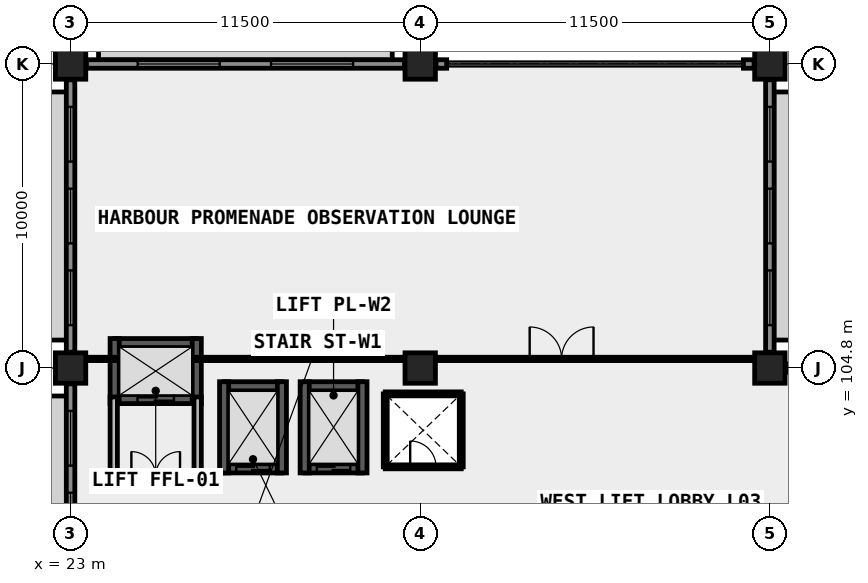
"""IFC4 building model, lengths in metres.
Left out: names, types, materials, properties, quantities, classifications, styles, units other than length and angle.
Written with IfcOpenShell. Run it as: python <this file> out.ifc"""

import sys

from ifc_helpers import new_model, si_unit, direction, frame, frame_2d, origin, origin_2d, place, context, subcontext, project, spatial, rectangle, extrude, element, fill, save


model = new_model("IFC4")
c1 = context("Model", 3, precision=1e-05, world=origin(), true_north=direction((0.0, 1.0)))
c2 = subcontext(c1, "Body", "Model", "MODEL_VIEW")
j1 = project(units=[si_unit("LENGTHUNIT", "METRE"), si_unit("PLANEANGLEUNIT", "RADIAN")], contexts=[c1])
p1 = place(None, origin())
s1 = spatial("IfcSite", under=j1, at=p1, CompositionType="ELEMENT")
p2 = place(p1, origin())
s2 = spatial("IfcBuilding", under=s1, at=p2, CompositionType="ELEMENT")
p3 = place(p2, frame((0.0, 0.0, 13.8)))
s3 = spatial("IfcBuildingStorey", under=s2, at=p3, CompositionType="ELEMENT", Elevation=13.8)
for number, where, z_axis, x_axis in (
    (1, (23.0, 104.8, 0.0), (0.0, 0.0, 1.0), (1.0, 0.0, 0.0)),
    (2, (23.0, 114.8, 0.0), (0.0, 0.0, 1.0), (1.0, 0.0, 0.0)),
    (3, (34.5, 104.8, 0.0), (0.0, 0.0, 1.0), (1.0, 0.0, 0.0)),
    (4, (34.5, 114.8, 0.0), (0.0, 0.0, 1.0), (1.0, 0.0, 0.0)),
    (5, (46.0, 104.8, 0.0), (0.0, 0.0, 1.0), (1.0, 0.0, 0.0)),
    (6, (46.0, 114.8, 0.0), (0.0, 0.0, 1.0), (1.0, 0.0, 0.0)),
):
    element("IfcColumn", number, at=place(p3, frame(where, z_axis=z_axis, x_axis=x_axis)), inside=s3, PredefinedType="COLUMN", context=c2, shape_type="SweptSolid", body=[
        extrude(rectangle(XDim=1.0, YDim=1.0, at=origin_2d()), origin(), (0.0, 0.0, 1.0), 4.5),
    ])
p4 = place(p3, frame((24.45, 103.78, 0.0), z_axis=(0.0, 0.0, 1.0), x_axis=(1.0, 0.0, 0.0)))
e7 = element("IfcWall", 7, at=p4, inside=s3, PredefinedType="SHEAR", context=c2, shape_type="SweptSolid", body=[
    extrude(rectangle(XDim=2.7, YDim=0.3, at=frame_2d((1.35, 0.0))), origin(), (0.0, 0.0, 1.0), 4.5),
])
p5 = place(p4, frame((0.75, 0.0, 0.0)))
e8 = element("IfcOpeningElement", 8, at=p5, cuts=e7, PredefinedType="OPENING", context=c2, shape_type="SweptSolid", body=[
    extrude(rectangle(XDim=1.2, YDim=2.15, at=frame_2d((0.6, 1.075))), frame((0.0, 0.16, 0.0), z_axis=(0.0, -1.0, 0.0), x_axis=(1.0, 0.0, 0.0)), (0.0, 0.0, 1.0), 0.32),
])
p6 = place(p3, frame((24.45, 105.62, 0.0), z_axis=(0.0, 0.0, 1.0), x_axis=(1.0, 0.0, 0.0)))
e9 = element("IfcWall", 9, at=p6, inside=s3, PredefinedType="SHEAR", context=c2, shape_type="SweptSolid", body=[
    extrude(rectangle(XDim=2.7, YDim=0.3, at=frame_2d((1.35, 0.0))), origin(), (0.0, 0.0, 1.0), 4.5),
])
for number, where, z_axis, x_axis in (
    (10, (24.45, 103.63, 0.0), (0.0, 0.0, 1.0), (0.0, 1.0, 0.0)),
    (11, (27.15, 103.63, 0.0), (0.0, 0.0, 1.0), (0.0, 1.0, 0.0)),
):
    element("IfcWall", number, at=place(p3, frame(where, z_axis=z_axis, x_axis=x_axis)), inside=s3, PredefinedType="SHEAR", context=c2, shape_type="SweptSolid", body=[
        extrude(rectangle(XDim=2.14, YDim=0.3, at=frame_2d((1.07, 0.0))), origin(), (0.0, 0.0, 1.0), 4.5),
    ])
p7 = place(p3, frame((28.05, 101.5, 0.0), z_axis=(0.0, 0.0, 1.0), x_axis=(1.0, 0.0, 0.0)))
e12 = element("IfcWall", 12, at=p7, inside=s3, PredefinedType="SHEAR", context=c2, shape_type="SweptSolid", body=[
    extrude(rectangle(XDim=1.9, YDim=0.3, at=frame_2d((0.95, 0.0))), origin(), (0.0, 0.0, 1.0), 4.5),
])
p8 = place(p7, frame((0.4, 0.0, 0.0)))
e13 = element("IfcOpeningElement", 13, at=p8, cuts=e12, PredefinedType="OPENING", context=c2, shape_type="SweptSolid", body=[
    extrude(rectangle(XDim=1.1, YDim=2.15, at=frame_2d((0.55, 1.075))), frame((0.0, 0.16, 0.0), z_axis=(0.0, -1.0, 0.0), x_axis=(1.0, 0.0, 0.0)), (0.0, 0.0, 1.0), 0.32),
])
p9 = place(p3, frame((28.05, 104.2, 0.0), z_axis=(0.0, 0.0, 1.0), x_axis=(1.0, 0.0, 0.0)))
e14 = element("IfcWall", 14, at=p9, inside=s3, PredefinedType="SHEAR", context=c2, shape_type="SweptSolid", body=[
    extrude(rectangle(XDim=1.9, YDim=0.3, at=frame_2d((0.95, 0.0))), origin(), (0.0, 0.0, 1.0), 4.5),
])
for number, where, z_axis, x_axis in (
    (15, (28.05, 101.35, 0.0), (0.0, 0.0, 1.0), (0.0, 1.0, 0.0)),
    (16, (29.95, 101.35, 0.0), (0.0, 0.0, 1.0), (0.0, 1.0, 0.0)),
):
    element("IfcWall", number, at=place(p3, frame(where, z_axis=z_axis, x_axis=x_axis)), inside=s3, PredefinedType="SHEAR", context=c2, shape_type="SweptSolid", body=[
        extrude(rectangle(XDim=3.0, YDim=0.3, at=frame_2d((1.5, 0.0))), origin(), (0.0, 0.0, 1.0), 4.5),
    ])
p10 = place(p3, frame((30.7, 101.5, 0.0), z_axis=(0.0, 0.0, 1.0), x_axis=(1.0, 0.0, 0.0)))
e17 = element("IfcWall", 17, at=p10, inside=s3, PredefinedType="SHEAR", context=c2, shape_type="SweptSolid", body=[
    extrude(rectangle(XDim=1.9, YDim=0.3, at=frame_2d((0.95, 0.0))), origin(), (0.0, 0.0, 1.0), 4.5),
])
p11 = place(p10, frame((0.4, 0.0, 0.0)))
e18 = element("IfcOpeningElement", 18, at=p11, cuts=e17, PredefinedType="OPENING", context=c2, shape_type="SweptSolid", body=[
    extrude(rectangle(XDim=1.1, YDim=2.15, at=frame_2d((0.55, 1.075))), frame((0.0, 0.16, 0.0), z_axis=(0.0, -1.0, 0.0), x_axis=(1.0, 0.0, 0.0)), (0.0, 0.0, 1.0), 0.32),
])
p12 = place(p3, frame((30.7, 104.2, 0.0), z_axis=(0.0, 0.0, 1.0), x_axis=(1.0, 0.0, 0.0)))
e19 = element("IfcWall", 19, at=p12, inside=s3, PredefinedType="SHEAR", context=c2, shape_type="SweptSolid", body=[
    extrude(rectangle(XDim=1.9, YDim=0.3, at=frame_2d((0.95, 0.0))), origin(), (0.0, 0.0, 1.0), 4.5),
])
for number, where, z_axis, x_axis in (
    (20, (30.7, 101.35, 0.0), (0.0, 0.0, 1.0), (0.0, 1.0, 0.0)),
    (21, (32.6, 101.35, 0.0), (0.0, 0.0, 1.0), (0.0, 1.0, 0.0)),
):
    element("IfcWall", number, at=place(p3, frame(where, z_axis=z_axis, x_axis=x_axis)), inside=s3, PredefinedType="SHEAR", context=c2, shape_type="SweptSolid", body=[
        extrude(rectangle(XDim=3.0, YDim=0.3, at=frame_2d((1.5, 0.0))), origin(), (0.0, 0.0, 1.0), 4.5),
    ])
p13 = place(p3, frame((46.52, 104.8, 0.0), z_axis=(0.0, 0.0, 1.0), x_axis=(1.0, 0.0, 0.0)))
e22 = element("IfcWall", 22, at=p13, inside=s3, PredefinedType="SOLIDWALL", context=c2, shape_type="SweptSolid", body=[
    extrude(rectangle(XDim=10.46, YDim=0.28, at=frame_2d((5.23, 0.0))), origin(), (0.0, 0.0, 1.0), 3.45),
])
p14 = place(p13, frame((1.265, 0.0, 0.85)))
e23 = element("IfcOpeningElement", 23, at=p14, cuts=e22, PredefinedType="OPENING", context=c2, shape_type="SweptSolid", body=[
    extrude(rectangle(XDim=1.8, YDim=1.95, at=frame_2d((0.9, 0.975))), frame((0.0, 0.15, 0.0), z_axis=(0.0, -1.0, 0.0), x_axis=(1.0, 0.0, 0.0)), (0.0, 0.0, 1.0), 0.3),
])
p15 = place(p13, frame((4.33, 0.0, 0.85)))
e24 = element("IfcOpeningElement", 24, at=p15, cuts=e22, PredefinedType="OPENING", context=c2, shape_type="SweptSolid", body=[
    extrude(rectangle(XDim=1.8, YDim=1.95, at=frame_2d((0.9, 0.975))), frame((0.0, 0.15, 0.0), z_axis=(0.0, -1.0, 0.0), x_axis=(1.0, 0.0, 0.0)), (0.0, 0.0, 1.0), 0.3),
])
p16 = place(p13, frame((7.395, 0.0, 0.85)))
e25 = element("IfcOpeningElement", 25, at=p16, cuts=e22, PredefinedType="OPENING", context=c2, shape_type="SweptSolid", body=[
    extrude(rectangle(XDim=1.8, YDim=1.95, at=frame_2d((0.9, 0.975))), frame((0.0, 0.15, 0.0), z_axis=(0.0, -1.0, 0.0), x_axis=(1.0, 0.0, 0.0)), (0.0, 0.0, 1.0), 0.3),
])
p17 = place(p3, frame((46.0, 105.32, 0.0), z_axis=(0.0, 0.0, 1.0), x_axis=(0.0, 1.0, 0.0)))
e26 = element("IfcWall", 26, at=p17, inside=s3, PredefinedType="SOLIDWALL", context=c2, shape_type="SweptSolid", body=[
    extrude(rectangle(XDim=8.96, YDim=0.28, at=frame_2d((4.48, 0.0))), origin(), (0.0, 0.0, 1.0), 3.45),
])
p18 = place(p17, frame((0.89, 0.0, 0.85)))
e27 = element("IfcOpeningElement", 27, at=p18, cuts=e26, PredefinedType="OPENING", context=c2, shape_type="SweptSolid", body=[
    extrude(rectangle(XDim=1.8, YDim=1.95, at=frame_2d((0.9, 0.975))), frame((0.0, 0.15, 0.0), z_axis=(0.0, -1.0, 0.0), x_axis=(1.0, 0.0, 0.0)), (0.0, 0.0, 1.0), 0.3),
])
p19 = place(p17, frame((3.58, 0.0, 0.85)))
e28 = element("IfcOpeningElement", 28, at=p19, cuts=e26, PredefinedType="OPENING", context=c2, shape_type="SweptSolid", body=[
    extrude(rectangle(XDim=1.8, YDim=1.95, at=frame_2d((0.9, 0.975))), frame((0.0, 0.15, 0.0), z_axis=(0.0, -1.0, 0.0), x_axis=(1.0, 0.0, 0.0)), (0.0, 0.0, 1.0), 0.3),
])
p20 = place(p17, frame((6.27, 0.0, 0.85)))
e29 = element("IfcOpeningElement", 29, at=p20, cuts=e26, PredefinedType="OPENING", context=c2, shape_type="SweptSolid", body=[
    extrude(rectangle(XDim=1.8, YDim=1.95, at=frame_2d((0.9, 0.975))), frame((0.0, 0.15, 0.0), z_axis=(0.0, -1.0, 0.0), x_axis=(1.0, 0.0, 0.0)), (0.0, 0.0, 1.0), 0.3),
])
p21 = place(p3, frame((23.52, 114.8, 0.0), z_axis=(0.0, 0.0, 1.0), x_axis=(1.0, 0.0, 0.0)))
e30 = element("IfcWall", 30, at=p21, inside=s3, PredefinedType="SOLIDWALL", context=c2, shape_type="SweptSolid", body=[
    extrude(rectangle(XDim=10.46, YDim=0.28, at=frame_2d((5.23, 0.0))), origin(), (0.0, 0.0, 1.0), 3.45),
])
p22 = place(p21, frame((1.687, 0.0, 0.85)))
e31 = element("IfcOpeningElement", 31, at=p22, cuts=e30, PredefinedType="OPENING", context=c2, shape_type="SweptSolid", body=[
    extrude(rectangle(XDim=2.7, YDim=2.15, at=frame_2d((1.35, 1.075))), frame((0.0, 0.15, 0.0), z_axis=(0.0, -1.0, 0.0), x_axis=(1.0, 0.0, 0.0)), (0.0, 0.0, 1.0), 0.3),
])
p23 = place(p21, frame((6.073, 0.0, 0.85)))
e32 = element("IfcOpeningElement", 32, at=p23, cuts=e30, PredefinedType="OPENING", context=c2, shape_type="SweptSolid", body=[
    extrude(rectangle(XDim=2.7, YDim=2.15, at=frame_2d((1.35, 1.075))), frame((0.0, 0.15, 0.0), z_axis=(0.0, -1.0, 0.0), x_axis=(1.0, 0.0, 0.0)), (0.0, 0.0, 1.0), 0.3),
])
for number, where, z_axis, x_axis in (
    (33, (35.02, 114.8, 0.0), (0.0, 0.0, 1.0), (1.0, 0.0, 0.0)),
    (34, (45.13, 114.8, 0.0), (0.0, 0.0, 1.0), (1.0, 0.0, 0.0)),
):
    element("IfcWall", number, at=place(p3, frame(where, z_axis=z_axis, x_axis=x_axis)), inside=s3, PredefinedType="SOLIDWALL", context=c2, shape_type="SweptSolid", body=[
        extrude(rectangle(XDim=0.35, YDim=0.28, at=frame_2d((0.175, 0.0))), origin(), (0.0, 0.0, 1.0), 4.23),
    ])
p24 = place(p3, frame((23.0, 95.32, 0.0), z_axis=(0.0, 0.0, 1.0), x_axis=(0.0, 1.0, 0.0)))
e35 = element("IfcWall", 35, at=p24, inside=s3, PredefinedType="SOLIDWALL", context=c2, shape_type="SweptSolid", body=[
    extrude(rectangle(XDim=8.96, YDim=0.28, at=frame_2d((4.48, 0.0))), origin(), (0.0, 0.0, 1.0), 3.45),
])
p25 = place(p24, frame((0.89, 0.0, 0.85)))
e36 = element("IfcOpeningElement", 36, at=p25, cuts=e35, PredefinedType="OPENING", context=c2, shape_type="SweptSolid", body=[
    extrude(rectangle(XDim=1.8, YDim=1.95, at=frame_2d((0.9, 0.975))), frame((0.0, 0.15, 0.0), z_axis=(0.0, -1.0, 0.0), x_axis=(1.0, 0.0, 0.0)), (0.0, 0.0, 1.0), 0.3),
])
p26 = place(p24, frame((3.58, 0.0, 0.85)))
e37 = element("IfcOpeningElement", 37, at=p26, cuts=e35, PredefinedType="OPENING", context=c2, shape_type="SweptSolid", body=[
    extrude(rectangle(XDim=1.8, YDim=1.95, at=frame_2d((0.9, 0.975))), frame((0.0, 0.15, 0.0), z_axis=(0.0, -1.0, 0.0), x_axis=(1.0, 0.0, 0.0)), (0.0, 0.0, 1.0), 0.3),
])
p27 = place(p24, frame((6.27, 0.0, 0.85)))
e38 = element("IfcOpeningElement", 38, at=p27, cuts=e35, PredefinedType="OPENING", context=c2, shape_type="SweptSolid", body=[
    extrude(rectangle(XDim=1.8, YDim=1.95, at=frame_2d((0.9, 0.975))), frame((0.0, 0.15, 0.0), z_axis=(0.0, -1.0, 0.0), x_axis=(1.0, 0.0, 0.0)), (0.0, 0.0, 1.0), 0.3),
])
p28 = place(p3, frame((23.0, 105.32, 0.0), z_axis=(0.0, 0.0, 1.0), x_axis=(0.0, 1.0, 0.0)))
e39 = element("IfcWall", 39, at=p28, inside=s3, PredefinedType="SOLIDWALL", context=c2, shape_type="SweptSolid", body=[
    extrude(rectangle(XDim=8.96, YDim=0.28, at=frame_2d((4.48, 0.0))), origin(), (0.0, 0.0, 1.0), 3.45),
])
p29 = place(p28, frame((0.89, 0.0, 0.85)))
e40 = element("IfcOpeningElement", 40, at=p29, cuts=e39, PredefinedType="OPENING", context=c2, shape_type="SweptSolid", body=[
    extrude(rectangle(XDim=1.8, YDim=1.95, at=frame_2d((0.9, 0.975))), frame((0.0, 0.15, 0.0), z_axis=(0.0, -1.0, 0.0), x_axis=(1.0, 0.0, 0.0)), (0.0, 0.0, 1.0), 0.3),
])
p30 = place(p28, frame((3.58, 0.0, 0.85)))
e41 = element("IfcOpeningElement", 41, at=p30, cuts=e39, PredefinedType="OPENING", context=c2, shape_type="SweptSolid", body=[
    extrude(rectangle(XDim=1.8, YDim=1.95, at=frame_2d((0.9, 0.975))), frame((0.0, 0.15, 0.0), z_axis=(0.0, -1.0, 0.0), x_axis=(1.0, 0.0, 0.0)), (0.0, 0.0, 1.0), 0.3),
])
p31 = place(p28, frame((6.27, 0.0, 0.85)))
e42 = element("IfcOpeningElement", 42, at=p31, cuts=e39, PredefinedType="OPENING", context=c2, shape_type="SweptSolid", body=[
    extrude(rectangle(XDim=1.8, YDim=1.95, at=frame_2d((0.9, 0.975))), frame((0.0, 0.15, 0.0), z_axis=(0.0, -1.0, 0.0), x_axis=(1.0, 0.0, 0.0)), (0.0, 0.0, 1.0), 0.3),
])
p32 = place(p3, frame((24.42, 101.25, 0.0), z_axis=(0.0, 0.0, 1.0), x_axis=(1.0, 0.0, 0.0)))
e43 = element("IfcWall", 43, at=p32, inside=s3, PredefinedType="SOLIDWALL", context=c2, shape_type="SweptSolid", body=[
    extrude(rectangle(XDim=2.76, YDim=0.24, at=frame_2d((1.38, 0.0))), origin(), (0.0, 0.0, 1.0), 4.22),
])
p33 = place(p32, frame((0.58, 0.0, 0.0)))
e44 = element("IfcOpeningElement", 44, at=p33, cuts=e43, PredefinedType="OPENING", context=c2, shape_type="SweptSolid", body=[
    extrude(rectangle(XDim=1.6, YDim=2.15, at=frame_2d((0.8, 1.075))), frame((0.0, 0.13, 0.0), z_axis=(0.0, -1.0, 0.0), x_axis=(1.0, 0.0, 0.0)), (0.0, 0.0, 1.0), 0.26),
])
for number, where, z_axis, x_axis in (
    (45, (24.42, 101.25, 0.0), (0.0, 0.0, 1.0), (0.0, 1.0, 0.0)),
    (46, (27.18, 101.25, 0.0), (0.0, 0.0, 1.0), (0.0, 1.0, 0.0)),
):
    element("IfcWall", number, at=place(p3, frame(where, z_axis=z_axis, x_axis=x_axis)), inside=s3, PredefinedType="SOLIDWALL", context=c2, shape_type="SweptSolid", body=[
        extrude(rectangle(XDim=2.6, YDim=0.24, at=frame_2d((1.3, 0.0))), origin(), (0.0, 0.0, 1.0), 4.22),
    ])
p34 = place(p3, frame((33.35, 101.55, 0.0), z_axis=(0.0, 0.0, 1.0), x_axis=(1.0, 0.0, 0.0)))
e47 = element("IfcWall", 47, at=p34, inside=s3, PredefinedType="PLUMBINGWALL", context=c2, shape_type="SweptSolid", body=[
    extrude(rectangle(XDim=2.5, YDim=0.13, at=frame_2d((1.25, 0.0))), origin(), (0.0, 0.0, 1.0), 4.22),
])
p35 = place(p34, frame((0.82, 0.0, 0.0)))
e48 = element("IfcOpeningElement", 48, at=p35, cuts=e47, PredefinedType="OPENING", context=c2, shape_type="SweptSolid", body=[
    extrude(rectangle(XDim=0.85, YDim=2.0, at=frame_2d((0.425, 1.0))), frame((0.0, 0.075, 0.0), z_axis=(0.0, -1.0, 0.0), x_axis=(1.0, 0.0, 0.0)), (0.0, 0.0, 1.0), 0.15),
])
for number, where, z_axis, x_axis in (
    (49, (33.35, 101.55, 0.0), (0.0, 0.0, 1.0), (0.0, 1.0, 0.0)),
    (50, (35.85, 101.55, 0.0), (0.0, 0.0, 1.0), (0.0, 1.0, 0.0)),
):
    element("IfcWall", number, at=place(p3, frame(where, z_axis=z_axis, x_axis=x_axis)), inside=s3, PredefinedType="PLUMBINGWALL", context=c2, shape_type="SweptSolid", body=[
        extrude(rectangle(XDim=2.4, YDim=0.13, at=frame_2d((1.2, 0.0))), origin(), (0.0, 0.0, 1.0), 4.22),
    ])
p36 = place(p3, frame((33.35, 103.95, 0.0), z_axis=(0.0, 0.0, 1.0), x_axis=(1.0, 0.0, 0.0)))
e51 = element("IfcWall", 51, at=p36, inside=s3, PredefinedType="PLUMBINGWALL", context=c2, shape_type="SweptSolid", body=[
    extrude(rectangle(XDim=2.5, YDim=0.13, at=frame_2d((1.25, 0.0))), origin(), (0.0, 0.0, 1.0), 4.22),
])
p37 = place(p3, frame((23.6, 105.1, 0.0), z_axis=(0.0, 0.0, 1.0), x_axis=(1.0, 0.0, 0.0)))
e52 = element("IfcWall", 52, at=p37, inside=s3, PredefinedType="MOVABLE", context=c2, shape_type="SweptSolid", body=[
    extrude(rectangle(XDim=21.8, YDim=0.11, at=frame_2d((10.9, 0.0))), origin(), (0.0, 0.0, 1.0), 4.22),
])
p38 = place(p37, frame((14.5, 0.0, 0.0)))
e53 = element("IfcOpeningElement", 53, at=p38, cuts=e52, PredefinedType="OPENING", context=c2, shape_type="SweptSolid", body=[
    extrude(rectangle(XDim=2.1, YDim=2.35, at=frame_2d((1.05, 1.175))), frame((0.0, 0.065, 0.0), z_axis=(0.0, -1.0, 0.0), x_axis=(1.0, 0.0, 0.0)), (0.0, 0.0, 1.0), 0.13),
])
p39 = place(p18, origin())
e54 = element("IfcWindow", 54, at=p39, inside=s3, PartitioningType="SINGLE_PANEL", PredefinedType="WINDOW", context=c2, shape_type="SweptSolid", body=[
    extrude(rectangle(XDim=1.8, YDim=1.95, at=frame_2d((0.9, 0.975))), frame((0.0, 0.03, 0.0), z_axis=(0.0, -1.0, 0.0), x_axis=(1.0, 0.0, 0.0)), (0.0, 0.0, 1.0), 0.06),
])
fill(e27, e54)
p40 = place(p19, origin())
e55 = element("IfcWindow", 55, at=p40, inside=s3, PartitioningType="SINGLE_PANEL", PredefinedType="WINDOW", context=c2, shape_type="SweptSolid", body=[
    extrude(rectangle(XDim=1.8, YDim=1.95, at=frame_2d((0.9, 0.975))), frame((0.0, 0.03, 0.0), z_axis=(0.0, -1.0, 0.0), x_axis=(1.0, 0.0, 0.0)), (0.0, 0.0, 1.0), 0.06),
])
fill(e28, e55)
p41 = place(p20, origin())
e56 = element("IfcWindow", 56, at=p41, inside=s3, PartitioningType="SINGLE_PANEL", PredefinedType="WINDOW", context=c2, shape_type="SweptSolid", body=[
    extrude(rectangle(XDim=1.8, YDim=1.95, at=frame_2d((0.9, 0.975))), frame((0.0, 0.03, 0.0), z_axis=(0.0, -1.0, 0.0), x_axis=(1.0, 0.0, 0.0)), (0.0, 0.0, 1.0), 0.06),
])
fill(e29, e56)
p42 = place(p22, origin())
e57 = element("IfcWindow", 57, at=p42, inside=s3, PartitioningType="SINGLE_PANEL", PredefinedType="WINDOW", context=c2, shape_type="SweptSolid", body=[
    extrude(rectangle(XDim=2.7, YDim=2.15, at=frame_2d((1.35, 1.075))), frame((0.0, 0.03, 0.0), z_axis=(0.0, -1.0, 0.0), x_axis=(1.0, 0.0, 0.0)), (0.0, 0.0, 1.0), 0.06),
])
fill(e31, e57)
p43 = place(p23, origin())
e58 = element("IfcWindow", 58, at=p43, inside=s3, PartitioningType="SINGLE_PANEL", PredefinedType="WINDOW", context=c2, shape_type="SweptSolid", body=[
    extrude(rectangle(XDim=2.7, YDim=2.15, at=frame_2d((1.35, 1.075))), frame((0.0, 0.03, 0.0), z_axis=(0.0, -1.0, 0.0), x_axis=(1.0, 0.0, 0.0)), (0.0, 0.0, 1.0), 0.06),
])
fill(e32, e58)
p44 = place(p26, origin())
e59 = element("IfcWindow", 59, at=p44, inside=s3, PartitioningType="SINGLE_PANEL", PredefinedType="WINDOW", context=c2, shape_type="SweptSolid", body=[
    extrude(rectangle(XDim=1.8, YDim=1.95, at=frame_2d((0.9, 0.975))), frame((0.0, 0.03, 0.0), z_axis=(0.0, -1.0, 0.0), x_axis=(1.0, 0.0, 0.0)), (0.0, 0.0, 1.0), 0.06),
])
fill(e37, e59)
p45 = place(p27, origin())
e60 = element("IfcWindow", 60, at=p45, inside=s3, PartitioningType="SINGLE_PANEL", PredefinedType="WINDOW", context=c2, shape_type="SweptSolid", body=[
    extrude(rectangle(XDim=1.8, YDim=1.95, at=frame_2d((0.9, 0.975))), frame((0.0, 0.03, 0.0), z_axis=(0.0, -1.0, 0.0), x_axis=(1.0, 0.0, 0.0)), (0.0, 0.0, 1.0), 0.06),
])
fill(e38, e60)
p46 = place(p29, origin())
e61 = element("IfcWindow", 61, at=p46, inside=s3, PartitioningType="SINGLE_PANEL", PredefinedType="WINDOW", context=c2, shape_type="SweptSolid", body=[
    extrude(rectangle(XDim=1.8, YDim=1.95, at=frame_2d((0.9, 0.975))), frame((0.0, 0.03, 0.0), z_axis=(0.0, -1.0, 0.0), x_axis=(1.0, 0.0, 0.0)), (0.0, 0.0, 1.0), 0.06),
])
fill(e40, e61)
p47 = place(p30, origin())
e62 = element("IfcWindow", 62, at=p47, inside=s3, PartitioningType="SINGLE_PANEL", PredefinedType="WINDOW", context=c2, shape_type="SweptSolid", body=[
    extrude(rectangle(XDim=1.8, YDim=1.95, at=frame_2d((0.9, 0.975))), frame((0.0, 0.03, 0.0), z_axis=(0.0, -1.0, 0.0), x_axis=(1.0, 0.0, 0.0)), (0.0, 0.0, 1.0), 0.06),
])
fill(e41, e62)
p48 = place(p31, origin())
e63 = element("IfcWindow", 63, at=p48, inside=s3, PartitioningType="SINGLE_PANEL", PredefinedType="WINDOW", context=c2, shape_type="SweptSolid", body=[
    extrude(rectangle(XDim=1.8, YDim=1.95, at=frame_2d((0.9, 0.975))), frame((0.0, 0.03, 0.0), z_axis=(0.0, -1.0, 0.0), x_axis=(1.0, 0.0, 0.0)), (0.0, 0.0, 1.0), 0.06),
])
fill(e42, e63)
p49 = place(p5, origin())
e64 = element("IfcDoor", 64, at=p49, inside=s3, OperationType="SLIDING_TO_RIGHT", PredefinedType="DOOR", context=c2, shape_type="SweptSolid", body=[
    extrude(rectangle(XDim=1.2, YDim=2.15, at=frame_2d((0.6, 1.075))), frame((0.0, 0.025, 0.0), z_axis=(0.0, -1.0, 0.0), x_axis=(1.0, 0.0, 0.0)), (0.0, 0.0, 1.0), 0.05),
])
fill(e8, e64)
p50 = place(p8, origin())
e65 = element("IfcDoor", 65, at=p50, inside=s3, OperationType="SLIDING_TO_LEFT", PredefinedType="DOOR", context=c2, shape_type="SweptSolid", body=[
    extrude(rectangle(XDim=1.1, YDim=2.15, at=frame_2d((0.55, 1.075))), frame((0.0, 0.025, 0.0), z_axis=(0.0, -1.0, 0.0), x_axis=(1.0, 0.0, 0.0)), (0.0, 0.0, 1.0), 0.05),
])
fill(e13, e65)
p51 = place(p11, origin())
e66 = element("IfcDoor", 66, at=p51, inside=s3, OperationType="SLIDING_TO_LEFT", PredefinedType="DOOR", context=c2, shape_type="SweptSolid", body=[
    extrude(rectangle(XDim=1.1, YDim=2.15, at=frame_2d((0.55, 1.075))), frame((0.0, 0.025, 0.0), z_axis=(0.0, -1.0, 0.0), x_axis=(1.0, 0.0, 0.0)), (0.0, 0.0, 1.0), 0.05),
])
fill(e18, e66)
p52 = place(p33, origin())
e67 = element("IfcDoor", 67, at=p52, inside=s3, OperationType="DOUBLE_DOOR_SINGLE_SWING", PredefinedType="DOOR", context=c2, shape_type="SweptSolid", body=[
    extrude(rectangle(XDim=1.6, YDim=2.15, at=frame_2d((0.8, 1.075))), frame((0.0, 0.025, 0.0), z_axis=(0.0, -1.0, 0.0), x_axis=(1.0, 0.0, 0.0)), (0.0, 0.0, 1.0), 0.05),
])
fill(e44, e67)
p53 = place(p35, origin())
e68 = element("IfcDoor", 68, at=p53, inside=s3, OperationType="SINGLE_SWING_LEFT", PredefinedType="TRAPDOOR", context=c2, shape_type="SweptSolid", body=[
    extrude(rectangle(XDim=0.85, YDim=2.0, at=frame_2d((0.425, 1.0))), frame((0.0, 0.025, 0.0), z_axis=(0.0, -1.0, 0.0), x_axis=(1.0, 0.0, 0.0)), (0.0, 0.0, 1.0), 0.05),
])
fill(e48, e68)
p54 = place(p38, origin())
e69 = element("IfcDoor", 69, at=p54, inside=s3, OperationType="DOUBLE_DOOR_SINGLE_SWING", PredefinedType="DOOR", context=c2, shape_type="SweptSolid", body=[
    extrude(rectangle(XDim=2.1, YDim=2.35, at=frame_2d((1.05, 1.175))), frame((0.0, 0.025, 0.0), z_axis=(0.0, -1.0, 0.0), x_axis=(1.0, 0.0, 0.0)), (0.0, 0.0, 1.0), 0.05),
])
fill(e53, e69)
save(model, sys.argv[1])
